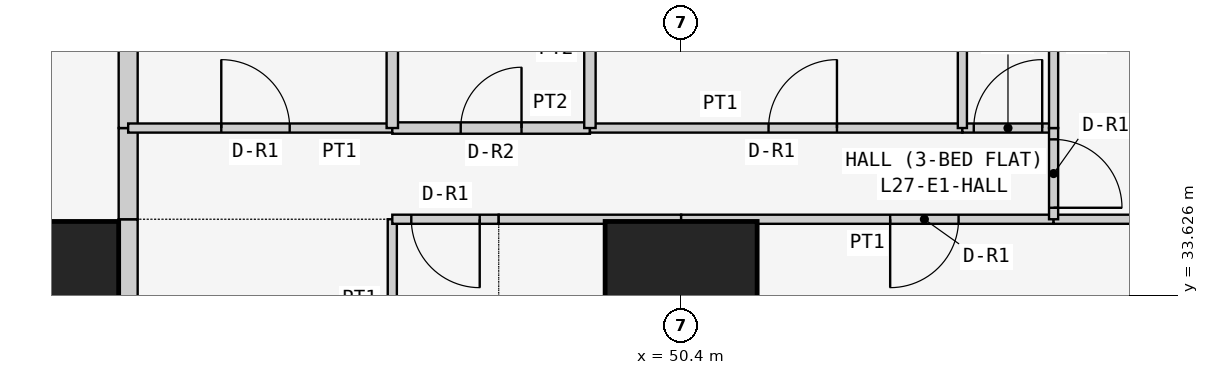
"""IFC4 building model, lengths in metres.
Left out: names, types, materials, properties, quantities, classifications, styles, units other than length and angle.
Written with IfcOpenShell. Run it as: python <this file> out.ifc"""

import sys

from ifc_helpers import new_model, si_unit, direction, frame, frame_2d, origin, origin_2d, place, context, subcontext, project, spatial, rectangle, extrude, element, fill, save


model = new_model("IFC4")
c1 = context("Model", 3, precision=1e-05, world=origin(), true_north=direction((0.0, 1.0)))
c2 = subcontext(c1, "Body", "Model", "MODEL_VIEW")
j1 = project(units=[si_unit("LENGTHUNIT", "METRE"), si_unit("PLANEANGLEUNIT", "RADIAN")], contexts=[c1])
p1 = place(None, origin())
s1 = spatial("IfcSite", under=j1, at=p1, CompositionType="ELEMENT")
p2 = place(p1, origin())
s2 = spatial("IfcBuilding", under=s1, at=p2, CompositionType="ELEMENT")
p3 = place(p2, frame((0.0, 0.0, 108.9)))
s3 = spatial("IfcBuildingStorey", under=s2, at=p3, CompositionType="ELEMENT", Elevation=108.9)
for number, where, z_axis, x_axis in (
    (1, (42.0, 33.6, 0.0), (0.0, 0.0, 1.0), (1.0, 0.0, 0.0)),
    (2, (50.4, 33.6, 0.0), (0.0, 0.0, 1.0), (1.0, 0.0, 0.0)),
):
    element("IfcColumn", number, at=place(p3, frame(where, z_axis=z_axis, x_axis=x_axis)), inside=s3, PredefinedType="COLUMN", context=c2, shape_type="SweptSolid", body=[
        extrude(rectangle(XDim=2.0, YDim=2.0, at=origin_2d()), origin(), (0.0, 0.0, 1.0), 3.6),
    ])
p4 = place(p3, frame((43.125, 34.629, 0.0), z_axis=(0.0, 0.0, 1.0), x_axis=(0.0, -1.0, 0.0)))
e3 = element("IfcWall", 3, at=p4, inside=s3, PredefinedType="PARTITIONING", context=c2, shape_type="SweptSolid", body=[
    extrude(rectangle(XDim=5.229, YDim=0.25, at=frame_2d((2.615, 0.0))), origin(), (0.0, 0.0, 1.0), 3.45),
])
p5 = place(p4, frame((2.229, 0.0, 0.0)))
e4 = element("IfcOpeningElement", 4, at=p5, cuts=e3, PredefinedType="OPENING", context=c2, shape_type="SweptSolid", body=[
    extrude(rectangle(XDim=1.0, YDim=2.1, at=frame_2d((0.5, 1.05))), frame((0.0, 0.135, 0.0), z_axis=(0.0, -1.0, 0.0), x_axis=(1.0, 0.0, 0.0)), (0.0, 0.0, 1.0), 0.27),
])
p6 = place(p3, frame((43.125, 35.829, 0.0), z_axis=(0.0, 0.0, 1.0), x_axis=(0.0, -1.0, 0.0)))
e5 = element("IfcWall", 5, at=p6, inside=s3, PredefinedType="PARTITIONING", context=c2, shape_type="SweptSolid", body=[
    extrude(rectangle(XDim=1.2, YDim=0.25, at=frame_2d((0.6, 0.0))), origin(), (0.0, 0.0, 1.0), 3.45),
])
p7 = place(p3, frame((43.125, 42.7, 0.0), z_axis=(0.0, 0.0, 1.0), x_axis=(0.0, -1.0, 0.0)))
e6 = element("IfcWall", 6, at=p7, inside=s3, PredefinedType="PARTITIONING", context=c2, shape_type="SweptSolid", body=[
    extrude(rectangle(XDim=6.871, YDim=0.25, at=frame_2d((3.436, 0.0))), origin(), (0.0, 0.0, 1.0), 3.45),
])
p8 = place(p3, frame((46.6, 29.4, 0.0), z_axis=(0.0, 0.0, 1.0), x_axis=(0.0, 1.0, 0.0)))
e7 = element("IfcWall", 7, at=p8, inside=s3, PredefinedType="PARTITIONING", context=c2, shape_type="SweptSolid", body=[
    extrude(rectangle(XDim=5.229, YDim=0.12, at=frame_2d((2.615, 0.0))), origin(), (0.0, 0.0, 1.0), 3.45),
])
p9 = place(p3, frame((48.0, 34.629, 0.0), z_axis=(0.0, 0.0, 1.0), x_axis=(-1.0, 0.0, 0.0)))
e8 = element("IfcWall", 8, at=p9, inside=s3, PredefinedType="PARTITIONING", context=c2, shape_type="SweptSolid", body=[
    extrude(rectangle(XDim=1.4, YDim=0.12, at=frame_2d((0.7, 0.0))), origin(), (0.0, 0.0, 1.0), 3.45),
])
p10 = place(p9, frame((0.25, 0.0, 0.0)))
e9 = element("IfcOpeningElement", 9, at=p10, cuts=e8, PredefinedType="OPENING", context=c2, shape_type="SweptSolid", body=[
    extrude(rectangle(XDim=0.9, YDim=2.1, at=frame_2d((0.45, 1.05))), frame((0.0, 0.07, 0.0), z_axis=(0.0, -1.0, 0.0), x_axis=(1.0, 0.0, 0.0)), (0.0, 0.0, 1.0), 0.14),
])
p11 = place(p3, frame((50.4, 34.629, 0.0), z_axis=(0.0, 0.0, 1.0), x_axis=(-1.0, 0.0, 0.0)))
e10 = element("IfcWall", 10, at=p11, inside=s3, PredefinedType="PARTITIONING", context=c2, shape_type="SweptSolid", body=[
    extrude(rectangle(XDim=2.4, YDim=0.12, at=frame_2d((1.2, 0.0))), origin(), (0.0, 0.0, 1.0), 3.45),
])
p12 = place(p3, frame((55.3, 34.629, 0.0), z_axis=(0.0, 0.0, 1.0), x_axis=(-1.0, 0.0, 0.0)))
e11 = element("IfcWall", 11, at=p12, inside=s3, PredefinedType="PARTITIONING", context=c2, shape_type="SweptSolid", body=[
    extrude(rectangle(XDim=4.9, YDim=0.12, at=frame_2d((2.45, 0.0))), origin(), (0.0, 0.0, 1.0), 3.45),
])
p13 = place(p12, frame((1.25, 0.0, 0.0)))
e12 = element("IfcOpeningElement", 12, at=p13, cuts=e11, PredefinedType="OPENING", context=c2, shape_type="SweptSolid", body=[
    extrude(rectangle(XDim=0.9, YDim=2.1, at=frame_2d((0.45, 1.05))), frame((0.0, 0.07, 0.0), z_axis=(0.0, -1.0, 0.0), x_axis=(1.0, 0.0, 0.0)), (0.0, 0.0, 1.0), 0.14),
])
p14 = place(p3, frame((59.45, 34.629, 0.0), z_axis=(0.0, 0.0, 1.0), x_axis=(-1.0, 0.0, 0.0)))
e13 = element("IfcWall", 13, at=p14, inside=s3, PredefinedType="PARTITIONING", context=c2, shape_type="SweptSolid", body=[
    extrude(rectangle(XDim=4.15, YDim=0.12, at=frame_2d((2.075, 0.0))), origin(), (0.0, 0.0, 1.0), 3.45),
])
p15 = place(p3, frame((46.6, 35.829, 0.0), z_axis=(0.0, 0.0, 1.0), x_axis=(-1.0, 0.0, 0.0)))
e14 = element("IfcWall", 14, at=p15, inside=s3, PredefinedType="PARTITIONING", context=c2, shape_type="SweptSolid", body=[
    extrude(rectangle(XDim=3.475, YDim=0.12, at=frame_2d((1.738, 0.0))), origin(), (0.0, 0.0, 1.0), 3.45),
])
p16 = place(p15, frame((1.35, 0.0, 0.0)))
e15 = element("IfcOpeningElement", 15, at=p16, cuts=e14, PredefinedType="OPENING", context=c2, shape_type="SweptSolid", body=[
    extrude(rectangle(XDim=0.9, YDim=2.1, at=frame_2d((0.45, 1.05))), frame((0.0, 0.07, 0.0), z_axis=(0.0, -1.0, 0.0), x_axis=(1.0, 0.0, 0.0)), (0.0, 0.0, 1.0), 0.14),
])
p17 = place(p3, frame((49.2, 35.829, 0.0), z_axis=(0.0, 0.0, 1.0), x_axis=(-1.0, 0.0, 0.0)))
e16 = element("IfcWall", 16, at=p17, inside=s3, PredefinedType="PARTITIONING", context=c2, shape_type="SweptSolid", body=[
    extrude(rectangle(XDim=2.6, YDim=0.15, at=frame_2d((1.3, 0.0))), origin(), (0.0, 0.0, 1.0), 3.45),
])
p18 = place(p17, frame((0.9, 0.0, 0.0)))
e17 = element("IfcOpeningElement", 17, at=p18, cuts=e16, PredefinedType="OPENING", context=c2, shape_type="SweptSolid", body=[
    extrude(rectangle(XDim=0.8, YDim=2.1, at=frame_2d((0.4, 1.05))), frame((0.0, 0.085, 0.0), z_axis=(0.0, -1.0, 0.0), x_axis=(1.0, 0.0, 0.0)), (0.0, 0.0, 1.0), 0.17),
])
p19 = place(p3, frame((54.1, 35.829, 0.0), z_axis=(0.0, 0.0, 1.0), x_axis=(-1.0, 0.0, 0.0)))
e18 = element("IfcWall", 18, at=p19, inside=s3, PredefinedType="PARTITIONING", context=c2, shape_type="SweptSolid", body=[
    extrude(rectangle(XDim=4.9, YDim=0.12, at=frame_2d((2.45, 0.0))), origin(), (0.0, 0.0, 1.0), 3.45),
])
p20 = place(p19, frame((1.65, 0.0, 0.0)))
e19 = element("IfcOpeningElement", 19, at=p20, cuts=e18, PredefinedType="OPENING", context=c2, shape_type="SweptSolid", body=[
    extrude(rectangle(XDim=0.9, YDim=2.1, at=frame_2d((0.45, 1.05))), frame((0.0, 0.07, 0.0), z_axis=(0.0, -1.0, 0.0), x_axis=(1.0, 0.0, 0.0)), (0.0, 0.0, 1.0), 0.14),
])
p21 = place(p3, frame((55.3, 35.829, 0.0), z_axis=(0.0, 0.0, 1.0), x_axis=(-1.0, 0.0, 0.0)))
e20 = element("IfcWall", 20, at=p21, inside=s3, PredefinedType="PARTITIONING", context=c2, shape_type="SweptSolid", body=[
    extrude(rectangle(XDim=1.2, YDim=0.12, at=frame_2d((0.6, 0.0))), origin(), (0.0, 0.0, 1.0), 3.45),
])
p22 = place(p21, frame((0.15, 0.0, 0.0)))
e21 = element("IfcOpeningElement", 21, at=p22, cuts=e20, PredefinedType="OPENING", context=c2, shape_type="SweptSolid", body=[
    extrude(rectangle(XDim=0.9, YDim=2.1, at=frame_2d((0.45, 1.05))), frame((0.0, 0.07, 0.0), z_axis=(0.0, -1.0, 0.0), x_axis=(1.0, 0.0, 0.0)), (0.0, 0.0, 1.0), 0.14),
])
p23 = place(p3, frame((55.3, 34.629, 0.0), z_axis=(0.0, 0.0, 1.0), x_axis=(0.0, 1.0, 0.0)))
e22 = element("IfcWall", 22, at=p23, inside=s3, PredefinedType="PARTITIONING", context=c2, shape_type="SweptSolid", body=[
    extrude(rectangle(XDim=1.2, YDim=0.12, at=frame_2d((0.6, 0.0))), origin(), (0.0, 0.0, 1.0), 3.45),
])
p24 = place(p23, frame((0.151, 0.0, 0.0)))
e23 = element("IfcOpeningElement", 23, at=p24, cuts=e22, PredefinedType="OPENING", context=c2, shape_type="SweptSolid", body=[
    extrude(rectangle(XDim=0.9, YDim=2.1, at=frame_2d((0.45, 1.05))), frame((0.0, 0.07, 0.0), z_axis=(0.0, -1.0, 0.0), x_axis=(1.0, 0.0, 0.0)), (0.0, 0.0, 1.0), 0.14),
])
for number, where, z_axis, x_axis in (
    (24, (46.6, 35.829, 0.0), (0.0, 0.0, 1.0), (0.0, 1.0, 0.0)),
    (25, (49.2, 35.829, 0.0), (0.0, 0.0, 1.0), (0.0, 1.0, 0.0)),
):
    element("IfcWall", number, at=place(p3, frame(where, z_axis=z_axis, x_axis=x_axis)), inside=s3, PredefinedType="PARTITIONING", context=c2, shape_type="SweptSolid", body=[
        extrude(rectangle(XDim=2.971, YDim=0.15, at=frame_2d((1.485, 0.0))), origin(), (0.0, 0.0, 1.0), 3.45),
    ])
for number, where, z_axis, x_axis in (
    (26, (54.1, 35.829, 0.0), (0.0, 0.0, 1.0), (0.0, 1.0, 0.0)),
    (27, (55.3, 35.829, 0.0), (0.0, 0.0, 1.0), (0.0, 1.0, 0.0)),
):
    element("IfcWall", number, at=place(p3, frame(where, z_axis=z_axis, x_axis=x_axis)), inside=s3, PredefinedType="PARTITIONING", context=c2, shape_type="SweptSolid", body=[
        extrude(rectangle(XDim=2.285, YDim=0.12, at=frame_2d((1.143, 0.0))), origin(), (0.0, 0.0, 1.0), 3.45),
    ])
p25 = place(p10, origin())
e28 = element("IfcDoor", 28, at=p25, inside=s3, OperationType="SINGLE_SWING_LEFT", PredefinedType="DOOR", context=c2, shape_type="SweptSolid", body=[
    extrude(rectangle(XDim=0.9, YDim=2.1, at=frame_2d((0.45, 1.05))), frame((0.0, 0.025, 0.0), z_axis=(0.0, -1.0, 0.0), x_axis=(1.0, 0.0, 0.0)), (0.0, 0.0, 1.0), 0.05),
])
fill(e9, e28)
p26 = place(p13, origin())
e29 = element("IfcDoor", 29, at=p26, inside=s3, OperationType="SINGLE_SWING_RIGHT", PredefinedType="DOOR", context=c2, shape_type="SweptSolid", body=[
    extrude(rectangle(XDim=0.9, YDim=2.1, at=frame_2d((0.45, 1.05))), frame((0.0, 0.025, 0.0), z_axis=(0.0, -1.0, 0.0), x_axis=(1.0, 0.0, 0.0)), (0.0, 0.0, 1.0), 0.05),
])
fill(e12, e29)
p27 = place(p16, frame((0.9, 0.0, 0.0), z_axis=(0.0, 0.0, 1.0), x_axis=(-1.0, 0.0, 0.0)))
e30 = element("IfcDoor", 30, at=p27, inside=s3, OperationType="SINGLE_SWING_LEFT", PredefinedType="DOOR", context=c2, shape_type="SweptSolid", body=[
    extrude(rectangle(XDim=0.9, YDim=2.1, at=frame_2d((0.45, 1.05))), frame((0.0, 0.025, 0.0), z_axis=(0.0, -1.0, 0.0), x_axis=(1.0, 0.0, 0.0)), (0.0, 0.0, 1.0), 0.05),
])
fill(e15, e30)
p28 = place(p18, frame((0.8, 0.0, 0.0), z_axis=(0.0, 0.0, 1.0), x_axis=(-1.0, 0.0, 0.0)))
e31 = element("IfcDoor", 31, at=p28, inside=s3, OperationType="SINGLE_SWING_RIGHT", PredefinedType="DOOR", context=c2, shape_type="SweptSolid", body=[
    extrude(rectangle(XDim=0.8, YDim=2.1, at=frame_2d((0.4, 1.05))), frame((0.0, 0.025, 0.0), z_axis=(0.0, -1.0, 0.0), x_axis=(1.0, 0.0, 0.0)), (0.0, 0.0, 1.0), 0.05),
])
fill(e17, e31)
p29 = place(p20, frame((0.9, 0.0, 0.0), z_axis=(0.0, 0.0, 1.0), x_axis=(-1.0, 0.0, 0.0)))
e32 = element("IfcDoor", 32, at=p29, inside=s3, OperationType="SINGLE_SWING_RIGHT", PredefinedType="DOOR", context=c2, shape_type="SweptSolid", body=[
    extrude(rectangle(XDim=0.9, YDim=2.1, at=frame_2d((0.45, 1.05))), frame((0.0, 0.025, 0.0), z_axis=(0.0, -1.0, 0.0), x_axis=(1.0, 0.0, 0.0)), (0.0, 0.0, 1.0), 0.05),
])
fill(e19, e32)
p30 = place(p22, frame((0.9, 0.0, 0.0), z_axis=(0.0, 0.0, 1.0), x_axis=(-1.0, 0.0, 0.0)))
e33 = element("IfcDoor", 33, at=p30, inside=s3, OperationType="SINGLE_SWING_RIGHT", PredefinedType="DOOR", context=c2, shape_type="SweptSolid", body=[
    extrude(rectangle(XDim=0.9, YDim=2.1, at=frame_2d((0.45, 1.05))), frame((0.0, 0.025, 0.0), z_axis=(0.0, -1.0, 0.0), x_axis=(1.0, 0.0, 0.0)), (0.0, 0.0, 1.0), 0.05),
])
fill(e21, e33)
p31 = place(p24, frame((0.9, 0.0, 0.0), z_axis=(0.0, 0.0, 1.0), x_axis=(-1.0, 0.0, 0.0)))
e34 = element("IfcDoor", 34, at=p31, inside=s3, OperationType="SINGLE_SWING_RIGHT", PredefinedType="DOOR", context=c2, shape_type="SweptSolid", body=[
    extrude(rectangle(XDim=0.9, YDim=2.1, at=frame_2d((0.45, 1.05))), frame((0.0, 0.025, 0.0), z_axis=(0.0, -1.0, 0.0), x_axis=(1.0, 0.0, 0.0)), (0.0, 0.0, 1.0), 0.05),
])
fill(e23, e34)
save(model, sys.argv[1])
